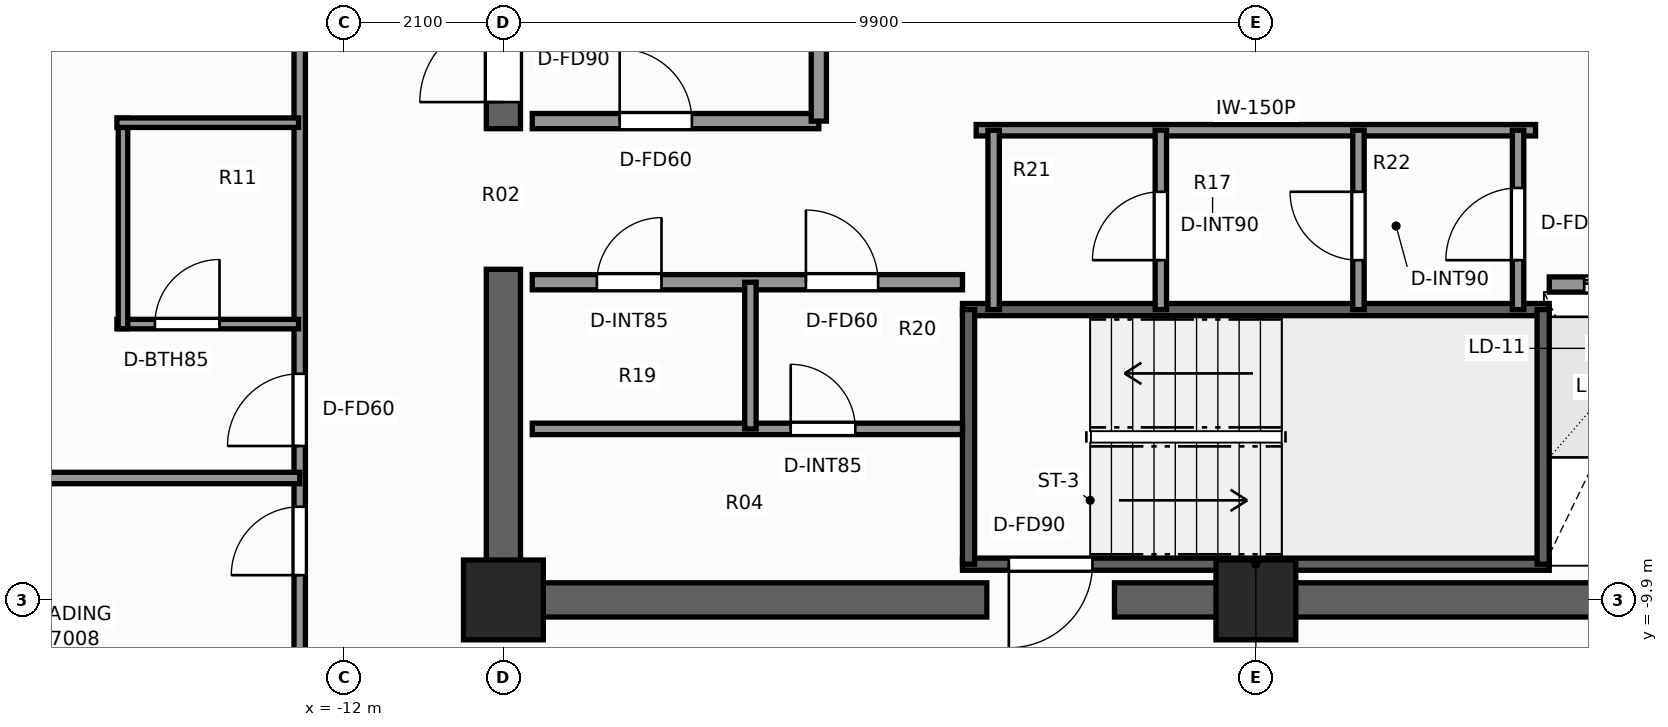
"""IFC4 building model, lengths in metres.
Left out: names, types, materials, properties, quantities, classifications, styles, units other than length and angle.
Written with IfcOpenShell. Run it as: python <this file> out.ifc"""

import sys

from ifc_helpers import new_model, si_unit, direction, frame, frame_2d, origin, origin_2d, place, context, subcontext, project, spatial, rectangle, extrude, element, fill, save


model = new_model("IFC4")
c1 = context("Model", 3, precision=1e-05, world=origin(), true_north=direction((0.0, 1.0)))
c2 = subcontext(c1, "Body", "Model", "MODEL_VIEW")
j1 = project(units=[si_unit("LENGTHUNIT", "METRE"), si_unit("PLANEANGLEUNIT", "RADIAN")], contexts=[c1])
p1 = place(None, origin())
s1 = spatial("IfcSite", under=j1, at=p1, CompositionType="ELEMENT")
p2 = place(p1, origin())
s2 = spatial("IfcBuilding", under=s1, at=p2, CompositionType="ELEMENT")
p3 = place(p2, frame((0.0, 0.0, 240.9)))
s3 = spatial("IfcBuildingStorey", under=s2, at=p3, CompositionType="ELEMENT", Elevation=240.9)
p4 = place(p3, frame((10.125, -9.9, 0.0), z_axis=(0.0, 0.0, 1.0), x_axis=(-1.0, 0.0, 0.0)))
e1 = element("IfcWall", 1, at=p4, inside=s3, PredefinedType="SHEAR", context=c2, shape_type="SweptSolid", body=[
    extrude(rectangle(XDim=11.985, YDim=0.45, at=frame_2d((5.993, 0.0))), origin(), (0.0, 0.0, 1.0), 3.5),
])
p5 = place(p3, frame((-3.54, -9.9, 0.0), z_axis=(0.0, 0.0, 1.0), x_axis=(-1.0, 0.0, 0.0)))
e2 = element("IfcWall", 2, at=p5, inside=s3, PredefinedType="SHEAR", context=c2, shape_type="SweptSolid", body=[
    extrude(rectangle(XDim=6.585, YDim=0.45, at=frame_2d((3.292, 0.0))), origin(), (0.0, 0.0, 1.0), 3.5),
])
p6 = place(p3, frame((-9.9, -9.675, 0.0), z_axis=(0.0, 0.0, 1.0), x_axis=(0.0, 1.0, 0.0)))
e3 = element("IfcWall", 3, at=p6, inside=s3, PredefinedType="SHEAR", context=c2, shape_type="SweptSolid", body=[
    extrude(rectangle(XDim=4.125, YDim=0.45, at=frame_2d((2.062, 0.0))), origin(), (0.0, 0.0, 1.0), 3.5),
])
p7 = place(p3, frame((-9.9, -3.7, 0.0), z_axis=(0.0, 0.0, 1.0), x_axis=(0.0, 1.0, 0.0)))
e4 = element("IfcWall", 4, at=p7, inside=s3, PredefinedType="SHEAR", context=c2, shape_type="SweptSolid", body=[
    extrude(rectangle(XDim=13.375, YDim=0.45, at=frame_2d((6.688, 0.0))), origin(), (0.0, 0.0, 1.0), 3.5),
])
p8 = place(p7, frame((0.35, 0.0, 0.0)))
e5 = element("IfcOpeningElement", 5, at=p8, cuts=e4, PredefinedType="OPENING", context=c2, shape_type="SweptSolid", body=[
    extrude(rectangle(XDim=1.1, YDim=2.2, at=frame_2d((0.55, 1.1))), frame((0.0, 0.235, 0.0), z_axis=(0.0, -1.0, 0.0), x_axis=(1.0, 0.0, 0.0)), (0.0, 0.0, 1.0), 0.47),
])
for number, where, z_axis, x_axis in (
    (6, (-9.9, -9.9, 0.0), (0.0, 0.0, 1.0), (1.0, 0.0, 0.0)),
    (7, (0.0, -9.9, 0.0), (0.0, 0.0, 1.0), (1.0, 0.0, 0.0)),
):
    element("IfcColumn", number, at=place(p3, frame(where, z_axis=z_axis, x_axis=x_axis)), inside=s3, PredefinedType="COLUMN", context=c2, shape_type="SweptSolid", body=[
        extrude(rectangle(XDim=1.05, YDim=1.05, at=origin_2d()), origin(), (0.0, 0.0, 1.0), 3.5),
    ])
p9 = place(p3, frame((3.86, -9.43, 0.0), z_axis=(0.0, 0.0, 1.0), x_axis=(-1.0, 0.0, 0.0)))
e8 = element("IfcWall", 8, at=p9, inside=s3, PredefinedType="SHEAR", context=c2, shape_type="SweptSolid", body=[
    extrude(rectangle(XDim=7.72, YDim=0.16, at=frame_2d((3.86, 0.0))), origin(), (0.0, 0.0, 1.0), 3.5),
])
p10 = place(p9, frame((6.01, 0.0, 0.0)))
e9 = element("IfcOpeningElement", 9, at=p10, cuts=e8, PredefinedType="OPENING", context=c2, shape_type="SweptSolid", body=[
    extrude(rectangle(XDim=1.1, YDim=2.2, at=frame_2d((0.55, 1.1))), frame((0.0, 0.09, 0.0), z_axis=(0.0, -1.0, 0.0), x_axis=(1.0, 0.0, 0.0)), (0.0, 0.0, 1.0), 0.18),
])
p11 = place(p3, frame((-3.86, -6.08, 0.0), z_axis=(0.0, 0.0, 1.0), x_axis=(1.0, 0.0, 0.0)))
e10 = element("IfcWall", 10, at=p11, inside=s3, PredefinedType="SHEAR", context=c2, shape_type="SweptSolid", body=[
    extrude(rectangle(XDim=7.72, YDim=0.16, at=frame_2d((3.86, 0.0))), origin(), (0.0, 0.0, 1.0), 3.5),
])
for number, where, z_axis, x_axis in (
    (11, (-3.78, -9.43, 0.0), (0.0, 0.0, 1.0), (0.0, 1.0, 0.0)),
    (12, (3.78, -9.43, 0.0), (0.0, 0.0, 1.0), (0.0, 1.0, 0.0)),
):
    element("IfcWall", number, at=place(p3, frame(where, z_axis=z_axis, x_axis=x_axis)), inside=s3, PredefinedType="SHEAR", context=c2, shape_type="SweptSolid", body=[
        extrude(rectangle(XDim=3.35, YDim=0.16, at=frame_2d((1.675, 0.0))), origin(), (0.0, 0.0, 1.0), 3.5),
    ])
p12 = place(p3, frame((-9.52, -3.6, 0.0), z_axis=(0.0, 0.0, 1.0), x_axis=(1.0, 0.0, 0.0)))
e13 = element("IfcWall", 13, at=p12, inside=s3, PredefinedType="SOLIDWALL", context=c2, shape_type="SweptSolid", body=[
    extrude(rectangle(XDim=3.77, YDim=0.2, at=frame_2d((1.885, 0.0))), origin(), (0.0, 0.0, 1.0), 3.25),
])
p13 = place(p12, frame((1.15, 0.0, 0.0)))
e14 = element("IfcOpeningElement", 14, at=p13, cuts=e13, PredefinedType="OPENING", context=c2, shape_type="SweptSolid", body=[
    extrude(rectangle(XDim=0.95, YDim=2.06, at=frame_2d((0.475, 1.03))), frame((0.0, 0.11, 0.0), z_axis=(0.0, -1.0, 0.0), x_axis=(1.0, 0.0, 0.0)), (0.0, 0.0, 1.0), 0.22),
])
p14 = place(p3, frame((-5.75, -3.6, 0.0), z_axis=(0.0, 0.0, 1.0), x_axis=(0.0, 1.0, 0.0)))
e15 = element("IfcWall", 15, at=p14, inside=s3, PredefinedType="SOLIDWALL", context=c2, shape_type="SweptSolid", body=[
    extrude(rectangle(XDim=5.57, YDim=0.2, at=frame_2d((2.785, 0.0))), origin(), (0.0, 0.0, 1.0), 3.25),
])
p15 = place(p14, frame((2.75, 0.0, 0.0)))
e16 = element("IfcOpeningElement", 16, at=p15, cuts=e15, PredefinedType="OPENING", context=c2, shape_type="SweptSolid", body=[
    extrude(rectangle(XDim=1.1, YDim=2.2, at=frame_2d((0.55, 1.1))), frame((0.0, 0.11, 0.0), z_axis=(0.0, -1.0, 0.0), x_axis=(1.0, 0.0, 0.0)), (0.0, 0.0, 1.0), 0.22),
])
p16 = place(p3, frame((-9.52, -5.72, 0.0), z_axis=(0.0, 0.0, 1.0), x_axis=(1.0, 0.0, 0.0)))
e17 = element("IfcWall", 17, at=p16, inside=s3, PredefinedType="SOLIDWALL", context=c2, shape_type="SweptSolid", body=[
    extrude(rectangle(XDim=5.66, YDim=0.2, at=frame_2d((2.83, 0.0))), origin(), (0.0, 0.0, 1.0), 3.25),
])
p17 = place(p16, frame((3.6, 0.0, 0.0)))
e18 = element("IfcOpeningElement", 18, at=p17, cuts=e17, PredefinedType="OPENING", context=c2, shape_type="SweptSolid", body=[
    extrude(rectangle(XDim=0.95, YDim=2.06, at=frame_2d((0.475, 1.03))), frame((0.0, 0.11, 0.0), z_axis=(0.0, -1.0, 0.0), x_axis=(1.0, 0.0, 0.0)), (0.0, 0.0, 1.0), 0.22),
])
p18 = place(p16, frame((0.85, 0.0, 0.0)))
e19 = element("IfcOpeningElement", 19, at=p18, cuts=e17, PredefinedType="OPENING", context=c2, shape_type="SweptSolid", body=[
    extrude(rectangle(XDim=0.85, YDim=2.03, at=frame_2d((0.425, 1.015))), frame((0.0, 0.11, 0.0), z_axis=(0.0, -1.0, 0.0), x_axis=(1.0, 0.0, 0.0)), (0.0, 0.0, 1.0), 0.22),
])
p19 = place(p3, frame((-9.52, -7.65, 0.0), z_axis=(0.0, 0.0, 1.0), x_axis=(1.0, 0.0, 0.0)))
e20 = element("IfcWall", 20, at=p19, inside=s3, PredefinedType="PARTITIONING", context=c2, shape_type="SweptSolid", body=[
    extrude(rectangle(XDim=5.66, YDim=0.15, at=frame_2d((2.83, 0.0))), origin(), (0.0, 0.0, 1.0), 3.25),
])
p20 = place(p19, frame((3.4, 0.0, 0.0)))
e21 = element("IfcOpeningElement", 21, at=p20, cuts=e20, PredefinedType="OPENING", context=c2, shape_type="SweptSolid", body=[
    extrude(rectangle(XDim=0.85, YDim=2.03, at=frame_2d((0.425, 1.015))), frame((0.0, 0.085, 0.0), z_axis=(0.0, -1.0, 0.0), x_axis=(1.0, 0.0, 0.0)), (0.0, 0.0, 1.0), 0.17),
])
p21 = place(p3, frame((-6.65, -7.65, 0.0), z_axis=(0.0, 0.0, 1.0), x_axis=(0.0, 1.0, 0.0)))
e22 = element("IfcWall", 22, at=p21, inside=s3, PredefinedType="PARTITIONING", context=c2, shape_type="SweptSolid", body=[
    extrude(rectangle(XDim=1.93, YDim=0.15, at=frame_2d((0.965, 0.0))), origin(), (0.0, 0.0, 1.0), 3.25),
])
p22 = place(p3, frame((3.86, -5.75, 0.0), z_axis=(0.0, 0.0, 1.0), x_axis=(1.0, 0.0, 0.0)))
e23 = element("IfcWall", 23, at=p22, inside=s3, PredefinedType="SOLIDWALL", context=c2, shape_type="SweptSolid", body=[
    extrude(rectangle(XDim=5.66, YDim=0.2, at=frame_2d((2.83, 0.0))), origin(), (0.0, 0.0, 1.0), 3.25),
])
p23 = place(p22, frame((0.46, 0.0, 0.0)))
e24 = element("IfcOpeningElement", 24, at=p23, cuts=e23, PredefinedType="OPENING", context=c2, shape_type="SweptSolid", body=[
    extrude(rectangle(XDim=1.1, YDim=2.2, at=frame_2d((0.55, 1.1))), frame((0.0, 0.11, 0.0), z_axis=(0.0, -1.0, 0.0), x_axis=(1.0, 0.0, 0.0)), (0.0, 0.0, 1.0), 0.22),
])
p24 = place(p22, frame((2.39, 0.0, 0.0)))
e25 = element("IfcOpeningElement", 25, at=p24, cuts=e23, PredefinedType="OPENING", context=c2, shape_type="SweptSolid", body=[
    extrude(rectangle(XDim=1.1, YDim=2.2, at=frame_2d((0.55, 1.1))), frame((0.0, 0.11, 0.0), z_axis=(0.0, -1.0, 0.0), x_axis=(1.0, 0.0, 0.0)), (0.0, 0.0, 1.0), 0.22),
])
p25 = place(p22, frame((4.32, 0.0, 0.0)))
e26 = element("IfcOpeningElement", 26, at=p25, cuts=e23, PredefinedType="OPENING", context=c2, shape_type="SweptSolid", body=[
    extrude(rectangle(XDim=1.1, YDim=2.2, at=frame_2d((0.55, 1.1))), frame((0.0, 0.11, 0.0), z_axis=(0.0, -1.0, 0.0), x_axis=(1.0, 0.0, 0.0)), (0.0, 0.0, 1.0), 0.22),
])
p26 = place(p3, frame((-3.68, -3.72, 0.0), z_axis=(0.0, 0.0, 1.0), x_axis=(1.0, 0.0, 0.0)))
e27 = element("IfcWall", 27, at=p26, inside=s3, PredefinedType="PARTITIONING", context=c2, shape_type="SweptSolid", body=[
    extrude(rectangle(XDim=7.36, YDim=0.15, at=frame_2d((3.68, 0.0))), origin(), (0.0, 0.0, 1.0), 3.25),
])
p27 = place(p3, frame((3.45, -6.08, 0.0), z_axis=(0.0, 0.0, 1.0), x_axis=(0.0, 1.0, 0.0)))
e28 = element("IfcWall", 28, at=p27, inside=s3, PredefinedType="PARTITIONING", context=c2, shape_type="SweptSolid", body=[
    extrude(rectangle(XDim=2.36, YDim=0.15, at=frame_2d((1.18, 0.0))), origin(), (0.0, 0.0, 1.0), 3.25),
])
p28 = place(p27, frame((0.65, 0.0, 0.0)))
e29 = element("IfcOpeningElement", 29, at=p28, cuts=e28, PredefinedType="OPENING", context=c2, shape_type="SweptSolid", body=[
    extrude(rectangle(XDim=0.95, YDim=2.06, at=frame_2d((0.475, 1.03))), frame((0.0, 0.085, 0.0), z_axis=(0.0, -1.0, 0.0), x_axis=(1.0, 0.0, 0.0)), (0.0, 0.0, 1.0), 0.17),
])
p29 = place(p3, frame((-3.45, -6.08, 0.0), z_axis=(0.0, 0.0, 1.0), x_axis=(0.0, 1.0, 0.0)))
e30 = element("IfcWall", 30, at=p29, inside=s3, PredefinedType="PARTITIONING", context=c2, shape_type="SweptSolid", body=[
    extrude(rectangle(XDim=2.36, YDim=0.15, at=frame_2d((1.18, 0.0))), origin(), (0.0, 0.0, 1.0), 3.25),
])
p30 = place(p3, frame((1.35, -6.08, 0.0), z_axis=(0.0, 0.0, 1.0), x_axis=(0.0, 1.0, 0.0)))
e31 = element("IfcWall", 31, at=p30, inside=s3, PredefinedType="PARTITIONING", context=c2, shape_type="SweptSolid", body=[
    extrude(rectangle(XDim=2.36, YDim=0.15, at=frame_2d((1.18, 0.0))), origin(), (0.0, 0.0, 1.0), 3.25),
])
p31 = place(p30, frame((0.65, 0.0, 0.0)))
e32 = element("IfcOpeningElement", 32, at=p31, cuts=e31, PredefinedType="OPENING", context=c2, shape_type="SweptSolid", body=[
    extrude(rectangle(XDim=0.9, YDim=2.06, at=frame_2d((0.45, 1.03))), frame((0.0, 0.085, 0.0), z_axis=(0.0, -1.0, 0.0), x_axis=(1.0, 0.0, 0.0)), (0.0, 0.0, 1.0), 0.17),
])
p32 = place(p3, frame((-1.25, -6.08, 0.0), z_axis=(0.0, 0.0, 1.0), x_axis=(0.0, 1.0, 0.0)))
e33 = element("IfcWall", 33, at=p32, inside=s3, PredefinedType="PARTITIONING", context=c2, shape_type="SweptSolid", body=[
    extrude(rectangle(XDim=2.36, YDim=0.15, at=frame_2d((1.18, 0.0))), origin(), (0.0, 0.0, 1.0), 3.25),
])
p33 = place(p32, frame((0.65, 0.0, 0.0)))
e34 = element("IfcOpeningElement", 34, at=p33, cuts=e33, PredefinedType="OPENING", context=c2, shape_type="SweptSolid", body=[
    extrude(rectangle(XDim=0.9, YDim=2.06, at=frame_2d((0.45, 1.03))), frame((0.0, 0.085, 0.0), z_axis=(0.0, -1.0, 0.0), x_axis=(1.0, 0.0, 0.0)), (0.0, 0.0, 1.0), 0.17),
])
p34 = place(p3, frame((-12.58, -12.26, 0.0), z_axis=(0.0, 0.0, 1.0), x_axis=(0.0, 1.0, 0.0)))
e35 = element("IfcWall", 35, at=p34, inside=s3, PredefinedType="PARTITIONING", context=c2, shape_type="SweptSolid", body=[
    extrude(rectangle(XDim=24.84, YDim=0.15, at=frame_2d((12.42, 0.0))), origin(), (0.0, 0.0, 1.0), 2.539),
])
p35 = place(p34, frame((2.686, 0.0, 0.0)))
e36 = element("IfcOpeningElement", 36, at=p35, cuts=e35, PredefinedType="OPENING", context=c2, shape_type="SweptSolid", body=[
    extrude(rectangle(XDim=0.9, YDim=2.06, at=frame_2d((0.45, 1.03))), frame((0.0, 0.085, 0.0), z_axis=(0.0, -1.0, 0.0), x_axis=(1.0, 0.0, 0.0)), (0.0, 0.0, 1.0), 0.17),
])
p36 = place(p34, frame((4.385, 0.0, 0.0)))
e37 = element("IfcOpeningElement", 37, at=p36, cuts=e35, PredefinedType="OPENING", context=c2, shape_type="SweptSolid", body=[
    extrude(rectangle(XDim=0.95, YDim=2.06, at=frame_2d((0.475, 1.03))), frame((0.0, 0.085, 0.0), z_axis=(0.0, -1.0, 0.0), x_axis=(1.0, 0.0, 0.0)), (0.0, 0.0, 1.0), 0.17),
])
p37 = place(p34, frame((13.796, 0.0, 0.0)))
e38 = element("IfcOpeningElement", 38, at=p37, cuts=e35, PredefinedType="OPENING", context=c2, shape_type="SweptSolid", body=[
    extrude(rectangle(XDim=0.95, YDim=2.06, at=frame_2d((0.475, 1.03))), frame((0.0, 0.085, 0.0), z_axis=(0.0, -1.0, 0.0), x_axis=(1.0, 0.0, 0.0)), (0.0, 0.0, 1.0), 0.17),
])
p38 = place(p34, frame((18.242, 0.0, 0.0)))
e39 = element("IfcOpeningElement", 39, at=p38, cuts=e35, PredefinedType="OPENING", context=c2, shape_type="SweptSolid", body=[
    extrude(rectangle(XDim=0.9, YDim=2.06, at=frame_2d((0.45, 1.03))), frame((0.0, 0.085, 0.0), z_axis=(0.0, -1.0, 0.0), x_axis=(1.0, 0.0, 0.0)), (0.0, 0.0, 1.0), 0.17),
])
p39 = place(p34, frame((20.059, 0.0, 0.0)))
e40 = element("IfcOpeningElement", 40, at=p39, cuts=e35, PredefinedType="OPENING", context=c2, shape_type="SweptSolid", body=[
    extrude(rectangle(XDim=0.95, YDim=2.06, at=frame_2d((0.475, 1.03))), frame((0.0, 0.085, 0.0), z_axis=(0.0, -1.0, 0.0), x_axis=(1.0, 0.0, 0.0)), (0.0, 0.0, 1.0), 0.17),
])
p40 = place(p3, frame((-18.38, -8.296, 0.0), z_axis=(0.0, 0.0, 1.0), x_axis=(1.0, 0.0, 0.0)))
e41 = element("IfcWall", 41, at=p40, inside=s3, PredefinedType="PARTITIONING", context=c2, shape_type="SweptSolid", body=[
    extrude(rectangle(XDim=5.8, YDim=0.15, at=frame_2d((2.9, 0.0))), origin(), (0.0, 0.0, 1.0), 2.623),
])
p41 = place(p3, frame((-14.985, -6.271, 0.0), z_axis=(0.0, 0.0, 1.0), x_axis=(1.0, 0.0, 0.0)))
e42 = element("IfcWall", 42, at=p41, inside=s3, PredefinedType="PARTITIONING", context=c2, shape_type="SweptSolid", body=[
    extrude(rectangle(XDim=2.39, YDim=0.125, at=frame_2d((1.195, 0.0))), origin(), (0.0, 0.0, 1.0), 3.25),
])
p42 = place(p41, frame((0.5, 0.0, 0.0)))
e43 = element("IfcOpeningElement", 43, at=p42, cuts=e42, PredefinedType="OPENING", context=c2, shape_type="SweptSolid", body=[
    extrude(rectangle(XDim=0.85, YDim=2.03, at=frame_2d((0.425, 1.015))), frame((0.0, 0.073, 0.0), z_axis=(0.0, -1.0, 0.0), x_axis=(1.0, 0.0, 0.0)), (0.0, 0.0, 1.0), 0.145),
])
p43 = place(p3, frame((-14.905, -6.331, 0.0), z_axis=(0.0, 0.0, 1.0), x_axis=(0.0, 1.0, 0.0)))
e44 = element("IfcWall", 44, at=p43, inside=s3, PredefinedType="PARTITIONING", context=c2, shape_type="SweptSolid", body=[
    extrude(rectangle(XDim=2.77, YDim=0.125, at=frame_2d((1.385, 0.0))), origin(), (0.0, 0.0, 1.0), 2.539),
])
p44 = place(p3, frame((-14.985, -3.621, 0.0), z_axis=(0.0, 0.0, 1.0), x_axis=(1.0, 0.0, 0.0)))
e45 = element("IfcWall", 45, at=p44, inside=s3, PredefinedType="PARTITIONING", context=c2, shape_type="SweptSolid", body=[
    extrude(rectangle(XDim=2.39, YDim=0.125, at=frame_2d((1.195, 0.0))), origin(), (0.0, 0.0, 1.0), 3.25),
])
p45 = place(p10, origin())
e46 = element("IfcDoor", 46, at=p45, inside=s3, OperationType="SINGLE_SWING_RIGHT", PredefinedType="DOOR", context=c2, shape_type="SweptSolid", body=[
    extrude(rectangle(XDim=1.1, YDim=2.2, at=frame_2d((0.55, 1.1))), frame((0.0, 0.025, 0.0), z_axis=(0.0, -1.0, 0.0), x_axis=(1.0, 0.0, 0.0)), (0.0, 0.0, 1.0), 0.05),
])
fill(e9, e46)
p46 = place(p8, origin())
e47 = element("IfcDoor", 47, at=p46, inside=s3, OperationType="SINGLE_SWING_LEFT", PredefinedType="DOOR", context=c2, shape_type="SweptSolid", body=[
    extrude(rectangle(XDim=1.1, YDim=2.2, at=frame_2d((0.55, 1.1))), frame((0.0, 0.025, 0.0), z_axis=(0.0, -1.0, 0.0), x_axis=(1.0, 0.0, 0.0)), (0.0, 0.0, 1.0), 0.05),
])
fill(e5, e47)
p47 = place(p17, origin())
e48 = element("IfcDoor", 48, at=p47, inside=s3, OperationType="SINGLE_SWING_LEFT", PredefinedType="DOOR", context=c2, shape_type="SweptSolid", body=[
    extrude(rectangle(XDim=0.95, YDim=2.06, at=frame_2d((0.475, 1.03))), frame((0.0, 0.025, 0.0), z_axis=(0.0, -1.0, 0.0), x_axis=(1.0, 0.0, 0.0)), (0.0, 0.0, 1.0), 0.05),
])
fill(e18, e48)
p48 = place(p18, origin())
e49 = element("IfcDoor", 49, at=p48, inside=s3, OperationType="SINGLE_SWING_RIGHT", PredefinedType="DOOR", context=c2, shape_type="SweptSolid", body=[
    extrude(rectangle(XDim=0.85, YDim=2.03, at=frame_2d((0.425, 1.015))), frame((0.0, 0.025, 0.0), z_axis=(0.0, -1.0, 0.0), x_axis=(1.0, 0.0, 0.0)), (0.0, 0.0, 1.0), 0.05),
])
fill(e19, e49)
p49 = place(p20, origin())
e50 = element("IfcDoor", 50, at=p49, inside=s3, OperationType="SINGLE_SWING_LEFT", PredefinedType="DOOR", context=c2, shape_type="SweptSolid", body=[
    extrude(rectangle(XDim=0.85, YDim=2.03, at=frame_2d((0.425, 1.015))), frame((0.0, 0.025, 0.0), z_axis=(0.0, -1.0, 0.0), x_axis=(1.0, 0.0, 0.0)), (0.0, 0.0, 1.0), 0.05),
])
fill(e21, e50)
p50 = place(p13, origin())
e51 = element("IfcDoor", 51, at=p50, inside=s3, OperationType="SINGLE_SWING_LEFT", PredefinedType="DOOR", context=c2, shape_type="SweptSolid", body=[
    extrude(rectangle(XDim=0.95, YDim=2.06, at=frame_2d((0.475, 1.03))), frame((0.0, 0.025, 0.0), z_axis=(0.0, -1.0, 0.0), x_axis=(1.0, 0.0, 0.0)), (0.0, 0.0, 1.0), 0.05),
])
fill(e14, e51)
p51 = place(p23, origin())
e52 = element("IfcDoor", 52, at=p51, inside=s3, OperationType="DOUBLE_DOOR_SLIDING", PredefinedType="DOOR", context=c2, shape_type="SweptSolid", body=[
    extrude(rectangle(XDim=1.1, YDim=2.2, at=frame_2d((0.55, 1.1))), frame((0.0, 0.025, 0.0), z_axis=(0.0, -1.0, 0.0), x_axis=(1.0, 0.0, 0.0)), (0.0, 0.0, 1.0), 0.05),
])
fill(e24, e52)
p52 = place(p28, origin())
e53 = element("IfcDoor", 53, at=p52, inside=s3, OperationType="SINGLE_SWING_LEFT", PredefinedType="DOOR", context=c2, shape_type="SweptSolid", body=[
    extrude(rectangle(XDim=0.95, YDim=2.06, at=frame_2d((0.475, 1.03))), frame((0.0, 0.025, 0.0), z_axis=(0.0, -1.0, 0.0), x_axis=(1.0, 0.0, 0.0)), (0.0, 0.0, 1.0), 0.05),
])
fill(e29, e53)
p53 = place(p31, origin())
e54 = element("IfcDoor", 54, at=p53, inside=s3, OperationType="SINGLE_SWING_RIGHT", PredefinedType="DOOR", context=c2, shape_type="SweptSolid", body=[
    extrude(rectangle(XDim=0.9, YDim=2.06, at=frame_2d((0.45, 1.03))), frame((0.0, 0.025, 0.0), z_axis=(0.0, -1.0, 0.0), x_axis=(1.0, 0.0, 0.0)), (0.0, 0.0, 1.0), 0.05),
])
fill(e32, e54)
p54 = place(p33, origin())
e55 = element("IfcDoor", 55, at=p54, inside=s3, OperationType="SINGLE_SWING_LEFT", PredefinedType="DOOR", context=c2, shape_type="SweptSolid", body=[
    extrude(rectangle(XDim=0.9, YDim=2.06, at=frame_2d((0.45, 1.03))), frame((0.0, 0.025, 0.0), z_axis=(0.0, -1.0, 0.0), x_axis=(1.0, 0.0, 0.0)), (0.0, 0.0, 1.0), 0.05),
])
fill(e34, e55)
p55 = place(p35, origin())
e56 = element("IfcDoor", 56, at=p55, inside=s3, OperationType="SINGLE_SWING_LEFT", PredefinedType="DOOR", context=c2, shape_type="SweptSolid", body=[
    extrude(rectangle(XDim=0.9, YDim=2.06, at=frame_2d((0.45, 1.03))), frame((0.0, 0.025, 0.0), z_axis=(0.0, -1.0, 0.0), x_axis=(1.0, 0.0, 0.0)), (0.0, 0.0, 1.0), 0.05),
])
fill(e36, e56)
p56 = place(p42, origin())
e57 = element("IfcDoor", 57, at=p56, inside=s3, OperationType="SINGLE_SWING_RIGHT", PredefinedType="DOOR", context=c2, shape_type="SweptSolid", body=[
    extrude(rectangle(XDim=0.85, YDim=2.03, at=frame_2d((0.425, 1.015))), frame((0.0, 0.025, 0.0), z_axis=(0.0, -1.0, 0.0), x_axis=(1.0, 0.0, 0.0)), (0.0, 0.0, 1.0), 0.05),
])
fill(e43, e57)
p57 = place(p36, origin())
e58 = element("IfcDoor", 58, at=p57, inside=s3, OperationType="SINGLE_SWING_LEFT", PredefinedType="DOOR", context=c2, shape_type="SweptSolid", body=[
    extrude(rectangle(XDim=0.95, YDim=2.06, at=frame_2d((0.475, 1.03))), frame((0.0, 0.025, 0.0), z_axis=(0.0, -1.0, 0.0), x_axis=(1.0, 0.0, 0.0)), (0.0, 0.0, 1.0), 0.05),
])
fill(e37, e58)
save(model, sys.argv[1])
